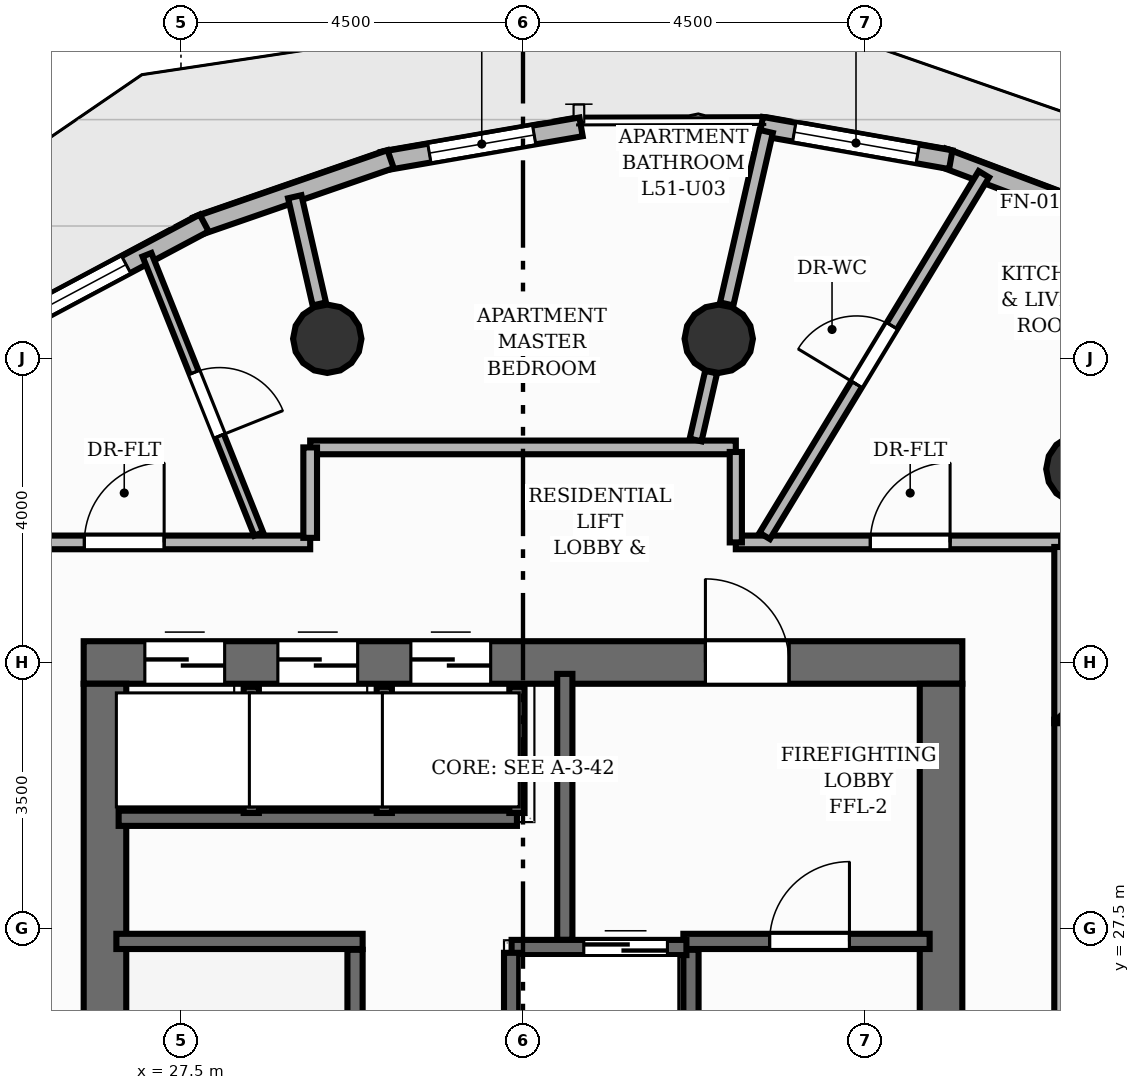
"""IFC4 building model, lengths in metres.
Left out: names, types, materials, properties, quantities, classifications, styles, units other than length and angle.
Written with IfcOpenShell. Run it as: python <this file> out.ifc"""

import sys

from ifc_helpers import new_model, si_unit, direction, frame, frame_2d, origin, origin_2d, place, context, subcontext, project, spatial, rectangle, circle, extrude, element, fill, save


model = new_model("IFC4")
c1 = context("Model", 3, precision=1e-05, world=origin(), true_north=direction((0.0, 1.0)))
c2 = subcontext(c1, "Body", "Model", "MODEL_VIEW")
j1 = project(units=[si_unit("LENGTHUNIT", "METRE"), si_unit("PLANEANGLEUNIT", "RADIAN")], contexts=[c1])
p1 = place(None, origin())
s1 = spatial("IfcSite", under=j1, at=p1, CompositionType="ELEMENT")
p2 = place(p1, origin())
s2 = spatial("IfcBuilding", under=s1, at=p2, CompositionType="ELEMENT")
p3 = place(p2, frame((0.0, 0.0, 172.64)))
s3 = spatial("IfcBuildingStorey", under=s2, at=p3, CompositionType="ELEMENT", Elevation=172.64)
p4 = place(p3, frame((26.22, 31.0, 0.0), z_axis=(0.0, 0.0, 1.0), x_axis=(1.0, 0.0, 0.0)))
e1 = element("IfcWall", 1, at=p4, inside=s3, PredefinedType="SHEAR", context=c2, shape_type="SweptSolid", body=[
    extrude(rectangle(XDim=11.56, YDim=0.56, at=frame_2d((5.78, 0.0))), origin(), (0.0, 0.0, 1.0), 3.2),
])
p5 = place(p4, frame((8.18, 0.0, 0.0)))
e2 = element("IfcOpeningElement", 2, at=p5, cuts=e1, PredefinedType="OPENING", context=c2, shape_type="SweptSolid", body=[
    extrude(rectangle(XDim=1.1, YDim=2.15, at=frame_2d((0.55, 1.075))), frame((0.0, 0.29, 0.0), z_axis=(0.0, -1.0, 0.0), x_axis=(1.0, 0.0, 0.0)), (0.0, 0.0, 1.0), 0.58),
])
p6 = place(p4, frame((0.805, 0.0, 0.0)))
e3 = element("IfcOpeningElement", 3, at=p6, cuts=e1, PredefinedType="OPENING", context=c2, shape_type="SweptSolid", body=[
    extrude(rectangle(XDim=1.05, YDim=2.15, at=frame_2d((0.525, 1.075))), frame((0.0, 0.29, 0.0), z_axis=(0.0, -1.0, 0.0), x_axis=(1.0, 0.0, 0.0)), (0.0, 0.0, 1.0), 0.58),
])
p7 = place(p4, frame((2.555, 0.0, 0.0)))
e4 = element("IfcOpeningElement", 4, at=p7, cuts=e1, PredefinedType="OPENING", context=c2, shape_type="SweptSolid", body=[
    extrude(rectangle(XDim=1.05, YDim=2.15, at=frame_2d((0.525, 1.075))), frame((0.0, 0.29, 0.0), z_axis=(0.0, -1.0, 0.0), x_axis=(1.0, 0.0, 0.0)), (0.0, 0.0, 1.0), 0.58),
])
p8 = place(p4, frame((4.305, 0.0, 0.0)))
e5 = element("IfcOpeningElement", 5, at=p8, cuts=e1, PredefinedType="OPENING", context=c2, shape_type="SweptSolid", body=[
    extrude(rectangle(XDim=1.05, YDim=2.15, at=frame_2d((0.525, 1.075))), frame((0.0, 0.29, 0.0), z_axis=(0.0, -1.0, 0.0), x_axis=(1.0, 0.0, 0.0)), (0.0, 0.0, 1.0), 0.58),
])
for number, where, z_axis, x_axis in (
    (6, (26.5, 17.28, 0.0), (0.0, 0.0, 1.0), (0.0, 1.0, 0.0)),
    (7, (37.5, 17.28, 0.0), (0.0, 0.0, 1.0), (0.0, 1.0, 0.0)),
):
    element("IfcWall", number, at=place(p3, frame(where, z_axis=z_axis, x_axis=x_axis)), inside=s3, PredefinedType="SHEAR", context=c2, shape_type="SweptSolid", body=[
        extrude(rectangle(XDim=13.44, YDim=0.56, at=frame_2d((6.72, 0.0))), origin(), (0.0, 0.0, 1.0), 3.2),
    ])
for number, where, z_axis, x_axis in (
    (8, (39.333, 33.545, 0.0), (0.0, 0.0, 1.0), (1.0, 0.0, 0.0)),
    (9, (34.575, 35.26, 0.0), (0.0, 0.0, 1.0), (1.0, 0.0, 0.0)),
    (10, (29.425, 35.26, 0.0), (0.0, 0.0, 1.0), (1.0, 0.0, 0.0)),
):
    element("IfcColumn", number, at=place(p3, frame(where, z_axis=z_axis, x_axis=x_axis)), inside=s3, PredefinedType="COLUMN", context=c2, shape_type="SweptSolid", body=[
        extrude(circle(Radius=0.45, at=origin_2d()), origin(), (0.0, 0.0, 1.0), 3.2),
    ])
p9 = place(p3, frame((37.519, 37.645, 0.0), z_axis=(0.0, 0.0, 1.0), x_axis=(0.93586674787, -0.352354126172, 0.0)))
e11 = element("IfcWall", 11, at=p9, inside=s3, PredefinedType="SOLIDWALL", context=c2, shape_type="SweptSolid", body=[
    extrude(rectangle(XDim=2.478, YDim=0.25, at=frame_2d((1.239, 0.0))), origin(), (0.0, 0.0, 1.0), 2.96),
])
p10 = place(p3, frame((35.135, 38.055, 0.0), z_axis=(0.0, 0.0, 1.0), x_axis=(0.984837873762, -0.173477267688, 0.0)))
e12 = element("IfcWall", 12, at=p10, inside=s3, PredefinedType="SOLIDWALL", context=c2, shape_type="SweptSolid", body=[
    extrude(rectangle(XDim=2.532, YDim=0.25, at=frame_2d((1.266, 0.0))), origin(), (0.0, 0.0, 1.0), 2.96),
])
p11 = place(p10, frame((0.441, 0.0, 0.85)))
e13 = element("IfcOpeningElement", 13, at=p11, cuts=e12, PredefinedType="OPENING", context=c2, shape_type="SweptSolid", body=[
    extrude(rectangle(XDim=1.65, YDim=1.55, at=frame_2d((0.825, 0.775))), frame((0.0, 0.135, 0.0), z_axis=(0.0, -1.0, 0.0), x_axis=(1.0, 0.0, 0.0)), (0.0, 0.0, 1.0), 0.27),
])
p12 = place(p3, frame((30.152, 37.595, 0.0), z_axis=(0.0, 0.0, 1.0), x_axis=(0.985331154473, 0.170653203967, 0.0)))
e14 = element("IfcWall", 14, at=p12, inside=s3, PredefinedType="SOLIDWALL", context=c2, shape_type="SweptSolid", body=[
    extrude(rectangle(XDim=2.651, YDim=0.25, at=frame_2d((1.325, 0.0))), origin(), (0.0, 0.0, 1.0), 2.96),
])
p13 = place(p12, frame((0.625, 0.0, 0.85)))
e15 = element("IfcOpeningElement", 15, at=p13, cuts=e14, PredefinedType="OPENING", context=c2, shape_type="SweptSolid", body=[
    extrude(rectangle(XDim=1.4, YDim=1.55, at=frame_2d((0.7, 0.775))), frame((0.0, 0.135, 0.0), z_axis=(0.0, -1.0, 0.0), x_axis=(1.0, 0.0, 0.0)), (0.0, 0.0, 1.0), 0.27),
])
p14 = place(p3, frame((27.705, 36.739, 0.0), z_axis=(0.0, 0.0, 1.0), x_axis=(0.945016150651, 0.327023661236, 0.0)))
e16 = element("IfcWall", 16, at=p14, inside=s3, PredefinedType="SOLIDWALL", context=c2, shape_type="SweptSolid", body=[
    extrude(rectangle(XDim=2.702, YDim=0.25, at=frame_2d((1.351, 0.0))), origin(), (0.0, 0.0, 1.0), 2.96),
])
p15 = place(p3, frame((25.388, 35.495, 0.0), z_axis=(0.0, 0.0, 1.0), x_axis=(0.88257494418, 0.47017174299, 0.0)))
e17 = element("IfcWall", 17, at=p15, inside=s3, PredefinedType="SOLIDWALL", context=c2, shape_type="SweptSolid", body=[
    extrude(rectangle(XDim=2.739, YDim=0.25, at=frame_2d((1.369, 0.0))), origin(), (0.0, 0.0, 1.0), 2.96),
])
p16 = place(p15, frame((0.175, 0.0, 0.85)))
e18 = element("IfcOpeningElement", 18, at=p16, cuts=e17, PredefinedType="OPENING", context=c2, shape_type="SweptSolid", body=[
    extrude(rectangle(XDim=1.4, YDim=1.55, at=frame_2d((0.7, 0.775))), frame((0.0, 0.135, 0.0), z_axis=(0.0, -1.0, 0.0), x_axis=(1.0, 0.0, 0.0)), (0.0, 0.0, 1.0), 0.27),
])
p17 = place(p3, frame((29.79, 20.78, 0.0), z_axis=(0.0, 0.0, 1.0), x_axis=(0.0, 1.0, 0.0)))
e19 = element("IfcWall", 19, at=p17, inside=s3, PredefinedType="SHEAR", context=c2, shape_type="SweptSolid", body=[
    extrude(rectangle(XDim=6.44, YDim=0.2, at=frame_2d((3.22, 0.0))), origin(), (0.0, 0.0, 1.0), 3.2),
])
p18 = place(p3, frame((26.65, 27.33, 0.0), z_axis=(0.0, 0.0, 1.0), x_axis=(1.0, 0.0, 0.0)))
e20 = element("IfcWall", 20, at=p18, inside=s3, PredefinedType="SHEAR", context=c2, shape_type="SweptSolid", body=[
    extrude(rectangle(XDim=3.24, YDim=0.2, at=frame_2d((1.62, 0.0))), origin(), (0.0, 0.0, 1.0), 3.2),
])
p19 = place(p3, frame((34.21, 20.78, 0.0), z_axis=(0.0, 0.0, 1.0), x_axis=(0.0, 1.0, 0.0)))
e21 = element("IfcWall", 21, at=p19, inside=s3, PredefinedType="SHEAR", context=c2, shape_type="SweptSolid", body=[
    extrude(rectangle(XDim=6.44, YDim=0.2, at=frame_2d((3.22, 0.0))), origin(), (0.0, 0.0, 1.0), 3.2),
])
p20 = place(p3, frame((34.11, 27.33, 0.0), z_axis=(0.0, 0.0, 1.0), x_axis=(1.0, 0.0, 0.0)))
e22 = element("IfcWall", 22, at=p20, inside=s3, PredefinedType="SHEAR", context=c2, shape_type="SweptSolid", body=[
    extrude(rectangle(XDim=3.24, YDim=0.2, at=frame_2d((1.62, 0.0))), origin(), (0.0, 0.0, 1.0), 3.2),
])
p21 = place(p20, frame((1.135, 0.0, 0.0)))
e23 = element("IfcOpeningElement", 23, at=p21, cuts=e22, PredefinedType="OPENING", context=c2, shape_type="SweptSolid", body=[
    extrude(rectangle(XDim=1.05, YDim=2.15, at=frame_2d((0.525, 1.075))), frame((0.0, 0.11, 0.0), z_axis=(0.0, -1.0, 0.0), x_axis=(1.0, 0.0, 0.0)), (0.0, 0.0, 1.0), 0.22),
])
p22 = place(p3, frame((32.55, 27.35, 0.0), z_axis=(0.0, 0.0, 1.0), x_axis=(0.0, 1.0, 0.0)))
e24 = element("IfcWall", 24, at=p22, inside=s3, PredefinedType="SHEAR", context=c2, shape_type="SweptSolid", body=[
    extrude(rectangle(XDim=3.5, YDim=0.2, at=frame_2d((1.75, 0.0))), origin(), (0.0, 0.0, 1.0), 3.2),
])
p23 = place(p3, frame((31.85, 27.25, 0.0), z_axis=(0.0, 0.0, 1.0), x_axis=(1.0, 0.0, 0.0)))
e25 = element("IfcWall", 25, at=p23, inside=s3, PredefinedType="SHEAR", context=c2, shape_type="SweptSolid", body=[
    extrude(rectangle(XDim=2.3, YDim=0.2, at=frame_2d((1.15, 0.0))), origin(), (0.0, 0.0, 1.0), 3.2),
])
p24 = place(p23, frame((0.95, 0.0, 0.0)))
e26 = element("IfcOpeningElement", 26, at=p24, cuts=e25, PredefinedType="OPENING", context=c2, shape_type="SweptSolid", body=[
    extrude(rectangle(XDim=1.1, YDim=2.15, at=frame_2d((0.55, 1.075))), frame((0.0, 0.11, 0.0), z_axis=(0.0, -1.0, 0.0), x_axis=(1.0, 0.0, 0.0)), (0.0, 0.0, 1.0), 0.22),
])
p25 = place(p3, frame((31.85, 25.47, 0.0), z_axis=(0.0, 0.0, 1.0), x_axis=(0.0, 1.0, 0.0)))
e27 = element("IfcWall", 27, at=p25, inside=s3, PredefinedType="SHEAR", context=c2, shape_type="SweptSolid", body=[
    extrude(rectangle(XDim=1.71, YDim=0.2, at=frame_2d((0.855, 0.0))), origin(), (0.0, 0.0, 1.0), 3.2),
])
p26 = place(p3, frame((26.68, 28.95, 0.0), z_axis=(0.0, 0.0, 1.0), x_axis=(1.0, 0.0, 0.0)))
e28 = element("IfcWall", 28, at=p26, inside=s3, PredefinedType="SHEAR", context=c2, shape_type="SweptSolid", body=[
    extrude(rectangle(XDim=5.24, YDim=0.2, at=frame_2d((2.62, 0.0))), origin(), (0.0, 0.0, 1.0), 3.2),
])
for number, where, z_axis, x_axis in (
    (29, (31.92, 29.02, 0.0), (0.0, 0.0, 1.0), (0.0, 1.0, 0.0)),
    (30, (28.425, 29.02, 0.0), (0.0, 0.0, 1.0), (0.0, 1.0, 0.0)),
    (31, (30.175, 29.02, 0.0), (0.0, 0.0, 1.0), (0.0, 1.0, 0.0)),
):
    element("IfcWall", number, at=place(p3, frame(where, z_axis=z_axis, x_axis=x_axis)), inside=s3, PredefinedType="SHEAR", context=c2, shape_type="SweptSolid", body=[
        extrude(rectangle(XDim=1.66, YDim=0.2, at=frame_2d((0.83, 0.0))), origin(), (0.0, 0.0, 1.0), 3.2),
    ])
p27 = place(p3, frame((34.68, 35.718, 0.0), z_axis=(0.0, 0.0, 1.0), x_axis=(0.222998449778, 0.974818799263, 0.0)))
e32 = element("IfcWall", 32, at=p27, inside=s3, PredefinedType="PARTITIONING", context=c2, shape_type="SweptSolid", body=[
    extrude(rectangle(XDim=2.329, YDim=0.18, at=frame_2d((1.164, 0.0))), origin(), (0.0, 0.0, 1.0), 2.404),
])
p28 = place(p3, frame((29.32, 35.718, 0.0), z_axis=(0.0, 0.0, 1.0), x_axis=(-0.22299884629, 0.974818708557, 0.0)))
e33 = element("IfcWall", 33, at=p28, inside=s3, PredefinedType="PARTITIONING", context=c2, shape_type="SweptSolid", body=[
    extrude(rectangle(XDim=1.447, YDim=0.18, at=frame_2d((0.724, 0.0))), origin(), (0.0, 0.0, 1.0), 2.404),
])
p29 = place(p3, frame((39.08, 30.248, 0.0), z_axis=(0.0, 0.0, 1.0), x_axis=(0.0, -1.0, 0.0)))
e34 = element("IfcWall", 34, at=p29, inside=s3, PredefinedType="PARTITIONING", context=c2, shape_type="SweptSolid", body=[
    extrude(rectangle(XDim=14.828, YDim=0.18, at=frame_2d((7.414, 0.0))), origin(), (0.0, 0.0, 1.0), 2.955),
])
p30 = place(p29, frame((6.351, 0.0, 0.0)))
e35 = element("IfcOpeningElement", 35, at=p30, cuts=e34, PredefinedType="OPENING", context=c2, shape_type="SweptSolid", body=[
    extrude(rectangle(XDim=1.05, YDim=2.15, at=frame_2d((0.525, 1.075))), frame((0.0, 0.1, 0.0), z_axis=(0.0, -1.0, 0.0), x_axis=(1.0, 0.0, 0.0)), (0.0, 0.0, 1.0), 0.2),
])
p31 = place(p3, frame((34.8, 32.58, 0.0), z_axis=(0.0, 0.0, 1.0), x_axis=(1.0, 0.0, 0.0)))
e36 = element("IfcWall", 36, at=p31, inside=s3, PredefinedType="PARTITIONING", context=c2, shape_type="SweptSolid", body=[
    extrude(rectangle(XDim=4.28, YDim=0.18, at=frame_2d((2.14, 0.0))), origin(), (0.0, 0.0, 1.0), 2.955),
])
p32 = place(p31, frame((1.769, 0.0, 0.0)))
e37 = element("IfcOpeningElement", 37, at=p32, cuts=e36, PredefinedType="OPENING", context=c2, shape_type="SweptSolid", body=[
    extrude(rectangle(XDim=1.05, YDim=2.15, at=frame_2d((0.525, 1.075))), frame((0.0, 0.1, 0.0), z_axis=(0.0, -1.0, 0.0), x_axis=(1.0, 0.0, 0.0)), (0.0, 0.0, 1.0), 0.2),
])
p33 = place(p3, frame((39.08, 32.52, 0.0), z_axis=(0.0, 0.0, 1.0), x_axis=(0.0, -1.0, 0.0)))
e38 = element("IfcWall", 38, at=p33, inside=s3, PredefinedType="PARTITIONING", context=c2, shape_type="SweptSolid", body=[
    extrude(rectangle(XDim=2.319, YDim=0.18, at=frame_2d((1.159, 0.0))), origin(), (0.0, 0.0, 1.0), 2.955),
])
p34 = place(p3, frame((29.2, 33.83, 0.0), z_axis=(0.0, 0.0, 1.0), x_axis=(1.0, 0.0, 0.0)))
e39 = element("IfcWall", 39, at=p34, inside=s3, PredefinedType="PARTITIONING", context=c2, shape_type="SweptSolid", body=[
    extrude(rectangle(XDim=5.6, YDim=0.18, at=frame_2d((2.8, 0.0))), origin(), (0.0, 0.0, 1.0), 2.955),
])
p35 = place(p3, frame((34.8, 33.77, 0.0), z_axis=(0.0, 0.0, 1.0), x_axis=(0.0, -1.0, 0.0)))
e40 = element("IfcWall", 40, at=p35, inside=s3, PredefinedType="PLUMBINGWALL", context=c2, shape_type="SweptSolid", body=[
    extrude(rectangle(XDim=1.19, YDim=0.16, at=frame_2d((0.595, 0.0))), origin(), (0.0, 0.0, 1.0), 2.955),
])
p36 = place(p3, frame((24.92, 32.58, 0.0), z_axis=(0.0, 0.0, 1.0), x_axis=(1.0, 0.0, 0.0)))
e41 = element("IfcWall", 41, at=p36, inside=s3, PredefinedType="PARTITIONING", context=c2, shape_type="SweptSolid", body=[
    extrude(rectangle(XDim=4.28, YDim=0.18, at=frame_2d((2.14, 0.0))), origin(), (0.0, 0.0, 1.0), 2.955),
])
p37 = place(p36, frame((1.309, 0.0, 0.0)))
e42 = element("IfcOpeningElement", 42, at=p37, cuts=e41, PredefinedType="OPENING", context=c2, shape_type="SweptSolid", body=[
    extrude(rectangle(XDim=1.05, YDim=2.15, at=frame_2d((0.525, 1.075))), frame((0.0, 0.1, 0.0), z_axis=(0.0, -1.0, 0.0), x_axis=(1.0, 0.0, 0.0)), (0.0, 0.0, 1.0), 0.2),
])
p38 = place(p3, frame((29.2, 32.64, 0.0), z_axis=(0.0, 0.0, 1.0), x_axis=(0.0, 1.0, 0.0)))
e43 = element("IfcWall", 43, at=p38, inside=s3, PredefinedType="PARTITIONING", context=c2, shape_type="SweptSolid", body=[
    extrude(rectangle(XDim=1.19, YDim=0.18, at=frame_2d((0.595, 0.0))), origin(), (0.0, 0.0, 1.0), 2.955),
])
p39 = place(p3, frame((35.18, 32.666, 0.0), z_axis=(0.0, 0.0, 1.0), x_axis=(0.518194743754, 0.855262654128, 0.0)))
e44 = element("IfcWall", 44, at=p39, inside=s3, PredefinedType="PLUMBINGWALL", context=c2, shape_type="SweptSolid", body=[
    extrude(rectangle(XDim=5.564, YDim=0.16, at=frame_2d((2.782, 0.0))), origin(), (0.0, 0.0, 1.0), 2.692),
])
p40 = place(p39, frame((2.332, 0.0, 0.0)))
e45 = element("IfcOpeningElement", 45, at=p40, cuts=e44, PredefinedType="OPENING", context=c2, shape_type="SweptSolid", body=[
    extrude(rectangle(XDim=0.9, YDim=2.1, at=frame_2d((0.45, 1.05))), frame((0.0, 0.09, 0.0), z_axis=(0.0, -1.0, 0.0), x_axis=(1.0, 0.0, 0.0)), (0.0, 0.0, 1.0), 0.18),
])
p41 = place(p3, frame((43.4, 34.017, 0.0), z_axis=(0.0, 0.0, 1.0), x_axis=(-0.751212741732, -0.660060161394, 0.0)))
e46 = element("IfcWall", 46, at=p41, inside=s3, PredefinedType="PARTITIONING", context=c2, shape_type="SweptSolid", body=[
    extrude(rectangle(XDim=5.75, YDim=0.125, at=frame_2d((2.875, 0.0))), origin(), (0.0, 0.0, 1.0), 2.955),
])
p42 = place(p41, frame((1.141, 0.0, 0.0)))
e47 = element("IfcOpeningElement", 47, at=p42, cuts=e46, PredefinedType="OPENING", context=c2, shape_type="SweptSolid", body=[
    extrude(rectangle(XDim=0.9, YDim=2.1, at=frame_2d((0.45, 1.05))), frame((0.0, 0.073, 0.0), z_axis=(0.0, -1.0, 0.0), x_axis=(1.0, 0.0, 0.0)), (0.0, 0.0, 1.0), 0.145),
])
p43 = place(p41, frame((3.856, 0.0, 0.0)))
e48 = element("IfcOpeningElement", 48, at=p43, cuts=e46, PredefinedType="OPENING", context=c2, shape_type="SweptSolid", body=[
    extrude(rectangle(XDim=0.9, YDim=2.1, at=frame_2d((0.45, 1.05))), frame((0.0, 0.073, 0.0), z_axis=(0.0, -1.0, 0.0), x_axis=(1.0, 0.0, 0.0)), (0.0, 0.0, 1.0), 0.145),
])
p44 = place(p3, frame((34.271, 33.927, 0.0), z_axis=(0.0, 0.0, 1.0), x_axis=(0.222991179816, 0.974820462303, 0.0)))
e49 = element("IfcWall", 49, at=p44, inside=s3, PredefinedType="PLUMBINGWALL", context=c2, shape_type="SweptSolid", body=[
    extrude(rectangle(XDim=0.917, YDim=0.16, at=frame_2d((0.458, 0.0))), origin(), (0.0, 0.0, 1.0), 2.404),
])
p45 = place(p3, frame((27.053, 36.365, 0.0), z_axis=(0.0, 0.0, 1.0), x_axis=(0.371454506587, -0.928451156247, 0.0)))
e50 = element("IfcWall", 50, at=p45, inside=s3, PredefinedType="PARTITIONING", context=c2, shape_type="SweptSolid", body=[
    extrude(rectangle(XDim=3.957, YDim=0.125, at=frame_2d((1.979, 0.0))), origin(), (0.0, 0.0, 1.0), 2.692),
])
p46 = place(p45, frame((1.668, 0.0, 0.0)))
e51 = element("IfcOpeningElement", 51, at=p46, cuts=e50, PredefinedType="OPENING", context=c2, shape_type="SweptSolid", body=[
    extrude(rectangle(XDim=0.9, YDim=2.1, at=frame_2d((0.45, 1.05))), frame((0.0, 0.073, 0.0), z_axis=(0.0, -1.0, 0.0), x_axis=(1.0, 0.0, 0.0)), (0.0, 0.0, 1.0), 0.145),
])
p47 = place(p11, origin())
e52 = element("IfcWindow", 52, at=p47, inside=s3, PartitioningType="SINGLE_PANEL", PredefinedType="WINDOW", context=c2, shape_type="SweptSolid", body=[
    extrude(rectangle(XDim=1.65, YDim=1.55, at=frame_2d((0.825, 0.775))), frame((0.0, 0.03, 0.0), z_axis=(0.0, -1.0, 0.0), x_axis=(1.0, 0.0, 0.0)), (0.0, 0.0, 1.0), 0.06),
])
fill(e13, e52)
p48 = place(p13, origin())
e53 = element("IfcWindow", 53, at=p48, inside=s3, PartitioningType="SINGLE_PANEL", PredefinedType="WINDOW", context=c2, shape_type="SweptSolid", body=[
    extrude(rectangle(XDim=1.4, YDim=1.55, at=frame_2d((0.7, 0.775))), frame((0.0, 0.03, 0.0), z_axis=(0.0, -1.0, 0.0), x_axis=(1.0, 0.0, 0.0)), (0.0, 0.0, 1.0), 0.06),
])
fill(e15, e53)
p49 = place(p16, origin())
e54 = element("IfcWindow", 54, at=p49, inside=s3, PartitioningType="SINGLE_PANEL", PredefinedType="WINDOW", context=c2, shape_type="SweptSolid", body=[
    extrude(rectangle(XDim=1.4, YDim=1.55, at=frame_2d((0.7, 0.775))), frame((0.0, 0.03, 0.0), z_axis=(0.0, -1.0, 0.0), x_axis=(1.0, 0.0, 0.0)), (0.0, 0.0, 1.0), 0.06),
])
fill(e18, e54)
p50 = place(p21, origin())
e55 = element("IfcDoor", 55, at=p50, inside=s3, OperationType="SINGLE_SWING_RIGHT", PredefinedType="DOOR", context=c2, shape_type="SweptSolid", body=[
    extrude(rectangle(XDim=1.05, YDim=2.15, at=frame_2d((0.525, 1.075))), frame((0.0, 0.025, 0.0), z_axis=(0.0, -1.0, 0.0), x_axis=(1.0, 0.0, 0.0)), (0.0, 0.0, 1.0), 0.05),
])
fill(e23, e55)
p51 = place(p5, origin())
e56 = element("IfcDoor", 56, at=p51, inside=s3, OperationType="SINGLE_SWING_LEFT", PredefinedType="DOOR", context=c2, shape_type="SweptSolid", body=[
    extrude(rectangle(XDim=1.1, YDim=2.15, at=frame_2d((0.55, 1.075))), frame((0.0, 0.025, 0.0), z_axis=(0.0, -1.0, 0.0), x_axis=(1.0, 0.0, 0.0)), (0.0, 0.0, 1.0), 0.05),
])
fill(e2, e56)
p52 = place(p24, origin())
e57 = element("IfcDoor", 57, at=p52, inside=s3, OperationType="DOUBLE_DOOR_SLIDING", PredefinedType="DOOR", context=c2, shape_type="SweptSolid", body=[
    extrude(rectangle(XDim=1.1, YDim=2.15, at=frame_2d((0.55, 1.075))), frame((0.0, 0.025, 0.0), z_axis=(0.0, -1.0, 0.0), x_axis=(1.0, 0.0, 0.0)), (0.0, 0.0, 1.0), 0.05),
])
fill(e26, e57)
p53 = place(p6, origin())
e58 = element("IfcDoor", 58, at=p53, inside=s3, OperationType="DOUBLE_DOOR_SLIDING", PredefinedType="DOOR", context=c2, shape_type="SweptSolid", body=[
    extrude(rectangle(XDim=1.05, YDim=2.15, at=frame_2d((0.525, 1.075))), frame((0.0, 0.025, 0.0), z_axis=(0.0, -1.0, 0.0), x_axis=(1.0, 0.0, 0.0)), (0.0, 0.0, 1.0), 0.05),
])
fill(e3, e58)
p54 = place(p7, origin())
e59 = element("IfcDoor", 59, at=p54, inside=s3, OperationType="DOUBLE_DOOR_SLIDING", PredefinedType="DOOR", context=c2, shape_type="SweptSolid", body=[
    extrude(rectangle(XDim=1.05, YDim=2.15, at=frame_2d((0.525, 1.075))), frame((0.0, 0.025, 0.0), z_axis=(0.0, -1.0, 0.0), x_axis=(1.0, 0.0, 0.0)), (0.0, 0.0, 1.0), 0.05),
])
fill(e4, e59)
p55 = place(p8, origin())
e60 = element("IfcDoor", 60, at=p55, inside=s3, OperationType="DOUBLE_DOOR_SLIDING", PredefinedType="DOOR", context=c2, shape_type="SweptSolid", body=[
    extrude(rectangle(XDim=1.05, YDim=2.15, at=frame_2d((0.525, 1.075))), frame((0.0, 0.025, 0.0), z_axis=(0.0, -1.0, 0.0), x_axis=(1.0, 0.0, 0.0)), (0.0, 0.0, 1.0), 0.05),
])
fill(e5, e60)
p56 = place(p32, origin())
e61 = element("IfcDoor", 61, at=p56, inside=s3, OperationType="SINGLE_SWING_RIGHT", PredefinedType="DOOR", context=c2, shape_type="SweptSolid", body=[
    extrude(rectangle(XDim=1.05, YDim=2.15, at=frame_2d((0.525, 1.075))), frame((0.0, 0.025, 0.0), z_axis=(0.0, -1.0, 0.0), x_axis=(1.0, 0.0, 0.0)), (0.0, 0.0, 1.0), 0.05),
])
fill(e37, e61)
p57 = place(p40, origin())
e62 = element("IfcDoor", 62, at=p57, inside=s3, OperationType="SINGLE_SWING_LEFT", PredefinedType="DOOR", context=c2, shape_type="SweptSolid", body=[
    extrude(rectangle(XDim=0.9, YDim=2.1, at=frame_2d((0.45, 1.05))), frame((0.0, 0.025, 0.0), z_axis=(0.0, -1.0, 0.0), x_axis=(1.0, 0.0, 0.0)), (0.0, 0.0, 1.0), 0.05),
])
fill(e45, e62)
p58 = place(p37, origin())
e63 = element("IfcDoor", 63, at=p58, inside=s3, OperationType="SINGLE_SWING_RIGHT", PredefinedType="DOOR", context=c2, shape_type="SweptSolid", body=[
    extrude(rectangle(XDim=1.05, YDim=2.15, at=frame_2d((0.525, 1.075))), frame((0.0, 0.025, 0.0), z_axis=(0.0, -1.0, 0.0), x_axis=(1.0, 0.0, 0.0)), (0.0, 0.0, 1.0), 0.05),
])
fill(e42, e63)
p59 = place(p46, origin())
e64 = element("IfcDoor", 64, at=p59, inside=s3, OperationType="SINGLE_SWING_RIGHT", PredefinedType="DOOR", context=c2, shape_type="SweptSolid", body=[
    extrude(rectangle(XDim=0.9, YDim=2.1, at=frame_2d((0.45, 1.05))), frame((0.0, 0.025, 0.0), z_axis=(0.0, -1.0, 0.0), x_axis=(1.0, 0.0, 0.0)), (0.0, 0.0, 1.0), 0.05),
])
fill(e51, e64)
save(model, sys.argv[1])
